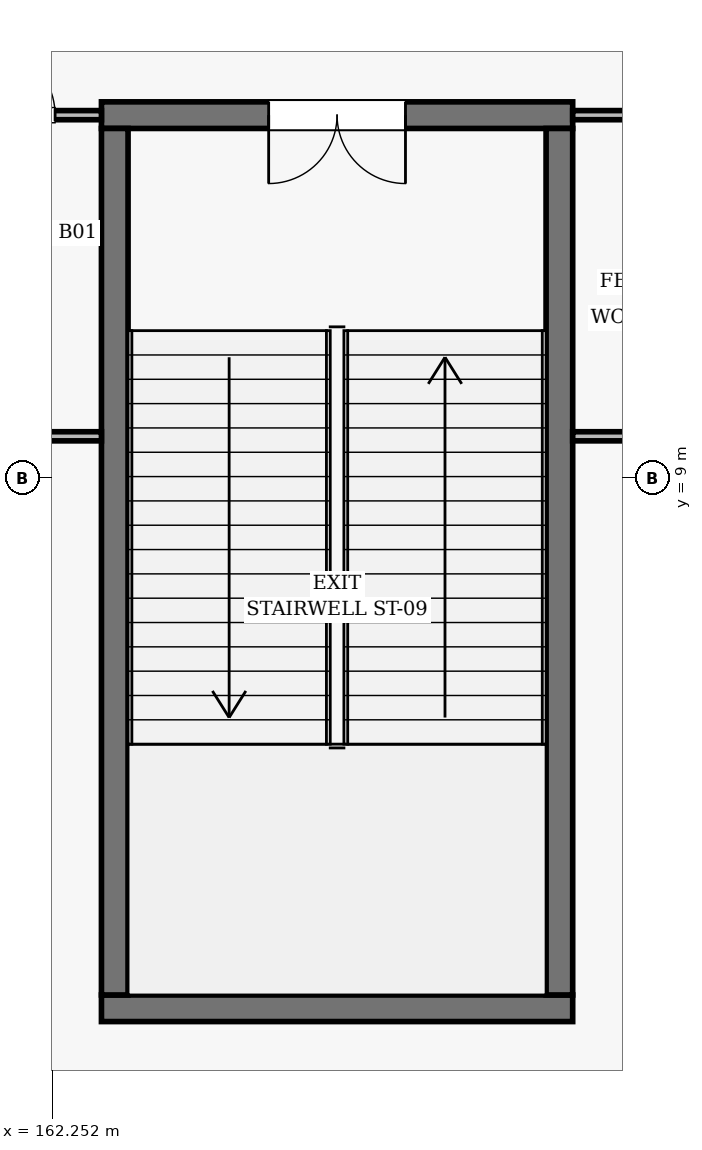
"""IFC4 building model, lengths in metres.
Left out: names, types, materials, properties, quantities, classifications, styles, units other than length and angle.
Written with IfcOpenShell. Run it as: python <this file> out.ifc"""

import sys

from ifc_helpers import new_model, si_unit, direction, frame, frame_2d, origin, place, context, subcontext, project, spatial, rectangle, extrude, element, fill, save


model = new_model("IFC4")
c1 = context("Model", 3, precision=1e-05, world=origin(), true_north=direction((0.0, 1.0)))
c2 = subcontext(c1, "Body", "Model", "MODEL_VIEW")
j1 = project(units=[si_unit("LENGTHUNIT", "METRE"), si_unit("PLANEANGLEUNIT", "RADIAN")], contexts=[c1])
p1 = place(None, origin())
s1 = spatial("IfcSite", under=j1, at=p1, CompositionType="ELEMENT")
p2 = place(p1, origin())
s2 = spatial("IfcBuilding", under=s1, at=p2, CompositionType="ELEMENT")
p3 = place(p2, frame((0.0, 0.0, -5.4)))
s3 = spatial("IfcBuildingStorey", under=s2, at=p3, CompositionType="ELEMENT", Elevation=-5.4)
p4 = place(p3, frame((162.9, 2.025, 0.0), z_axis=(0.0, 0.0, 1.0), x_axis=(1.0, 0.0, 0.0)))
e1 = element("IfcWall", 1, at=p4, inside=s3, PredefinedType="SHEAR", context=c2, shape_type="SweptSolid", body=[
    extrude(rectangle(XDim=6.2, YDim=0.35, at=frame_2d((3.1, 0.0))), origin(), (0.0, 0.0, 1.0), 5.12),
])
p5 = place(p3, frame((169.1, 13.775, 0.0), z_axis=(0.0, 0.0, 1.0), x_axis=(-1.0, 0.0, 0.0)))
e2 = element("IfcWall", 2, at=p5, inside=s3, PredefinedType="SHEAR", context=c2, shape_type="SweptSolid", body=[
    extrude(rectangle(XDim=6.2, YDim=0.35, at=frame_2d((3.1, 0.0))), origin(), (0.0, 0.0, 1.0), 5.12),
])
p6 = place(p5, frame((2.2, 0.0, 0.0)))
e3 = element("IfcOpeningElement", 3, at=p6, cuts=e2, PredefinedType="OPENING", context=c2, shape_type="SweptSolid", body=[
    extrude(rectangle(XDim=1.8, YDim=2.2, at=frame_2d((0.9, 1.1))), frame((0.0, 0.185, 0.0), z_axis=(0.0, -1.0, 0.0), x_axis=(1.0, 0.0, 0.0)), (0.0, 0.0, 1.0), 0.37),
])
for number, where, z_axis, x_axis in (
    (4, (163.075, 13.6, 0.0), (0.0, 0.0, 1.0), (0.0, -1.0, 0.0)),
    (5, (168.925, 2.2, 0.0), (0.0, 0.0, 1.0), (0.0, 1.0, 0.0)),
):
    element("IfcWall", number, at=place(p3, frame(where, z_axis=z_axis, x_axis=x_axis)), inside=s3, PredefinedType="SHEAR", context=c2, shape_type="SweptSolid", body=[
        extrude(rectangle(XDim=11.4, YDim=0.35, at=frame_2d((5.7, 0.0))), origin(), (0.0, 0.0, 1.0), 5.12),
    ])
p7 = place(p3, frame((160.76, 13.775, 0.0), z_axis=(0.0, 0.0, 1.0), x_axis=(1.0, 0.0, 0.0)))
e6 = element("IfcWall", 6, at=p7, inside=s3, PredefinedType="PARTITIONING", context=c2, shape_type="SweptSolid", body=[
    extrude(rectangle(XDim=2.14, YDim=0.12, at=frame_2d((1.07, 0.0))), origin(), (0.0, 0.0, 1.0), 4.332),
])
p8 = place(p7, frame((0.61, 0.0, 0.0)))
e7 = element("IfcOpeningElement", 7, at=p8, cuts=e6, PredefinedType="OPENING", context=c2, shape_type="SweptSolid", body=[
    extrude(rectangle(XDim=0.92, YDim=2.12, at=frame_2d((0.46, 1.06))), frame((0.0, 0.07, 0.0), z_axis=(0.0, -1.0, 0.0), x_axis=(1.0, 0.0, 0.0)), (0.0, 0.0, 1.0), 0.14),
])
p9 = place(p3, frame((162.9, 9.55, 0.0), z_axis=(0.0, 0.0, 1.0), x_axis=(-1.0, 0.0, 0.0)))
e8 = element("IfcWall", 8, at=p9, inside=s3, PredefinedType="PARTITIONING", context=c2, shape_type="SweptSolid", body=[
    extrude(rectangle(XDim=3.3, YDim=0.12, at=frame_2d((1.65, 0.0))), origin(), (0.0, 0.0, 1.0), 4.332),
])
p10 = place(p3, frame((169.1, 13.775, 0.0), z_axis=(0.0, 0.0, 1.0), x_axis=(1.0, 0.0, 0.0)))
e9 = element("IfcWall", 9, at=p10, inside=s3, PredefinedType="PARTITIONING", context=c2, shape_type="SweptSolid", body=[
    extrude(rectangle(XDim=3.0, YDim=0.12, at=frame_2d((1.5, 0.0))), origin(), (0.0, 0.0, 1.0), 4.332),
])
p11 = place(p10, frame((1.04, 0.0, 0.0)))
e10 = element("IfcOpeningElement", 10, at=p11, cuts=e9, PredefinedType="OPENING", context=c2, shape_type="SweptSolid", body=[
    extrude(rectangle(XDim=0.92, YDim=2.12, at=frame_2d((0.46, 1.06))), frame((0.0, 0.07, 0.0), z_axis=(0.0, -1.0, 0.0), x_axis=(1.0, 0.0, 0.0)), (0.0, 0.0, 1.0), 0.14),
])
p12 = place(p3, frame((172.1, 9.55, 0.0), z_axis=(0.0, 0.0, 1.0), x_axis=(-1.0, 0.0, 0.0)))
e11 = element("IfcWall", 11, at=p12, inside=s3, PredefinedType="PARTITIONING", context=c2, shape_type="SweptSolid", body=[
    extrude(rectangle(XDim=3.0, YDim=0.12, at=frame_2d((1.5, 0.0))), origin(), (0.0, 0.0, 1.0), 4.332),
])
p13 = place(p6, origin())
e12 = element("IfcDoor", 12, at=p13, inside=s3, OperationType="DOUBLE_DOOR_SINGLE_SWING", PredefinedType="DOOR", context=c2, shape_type="SweptSolid", body=[
    extrude(rectangle(XDim=1.8, YDim=2.2, at=frame_2d((0.9, 1.1))), frame((0.0, 0.025, 0.0), z_axis=(0.0, -1.0, 0.0), x_axis=(1.0, 0.0, 0.0)), (0.0, 0.0, 1.0), 0.05),
])
fill(e3, e12)
p14 = place(p8, origin())
e13 = element("IfcDoor", 13, at=p14, inside=s3, OperationType="SINGLE_SWING_LEFT", PredefinedType="DOOR", context=c2, shape_type="SweptSolid", body=[
    extrude(rectangle(XDim=0.92, YDim=2.12, at=frame_2d((0.46, 1.06))), frame((0.0, 0.025, 0.0), z_axis=(0.0, -1.0, 0.0), x_axis=(1.0, 0.0, 0.0)), (0.0, 0.0, 1.0), 0.05),
])
fill(e7, e13)
save(model, sys.argv[1])
